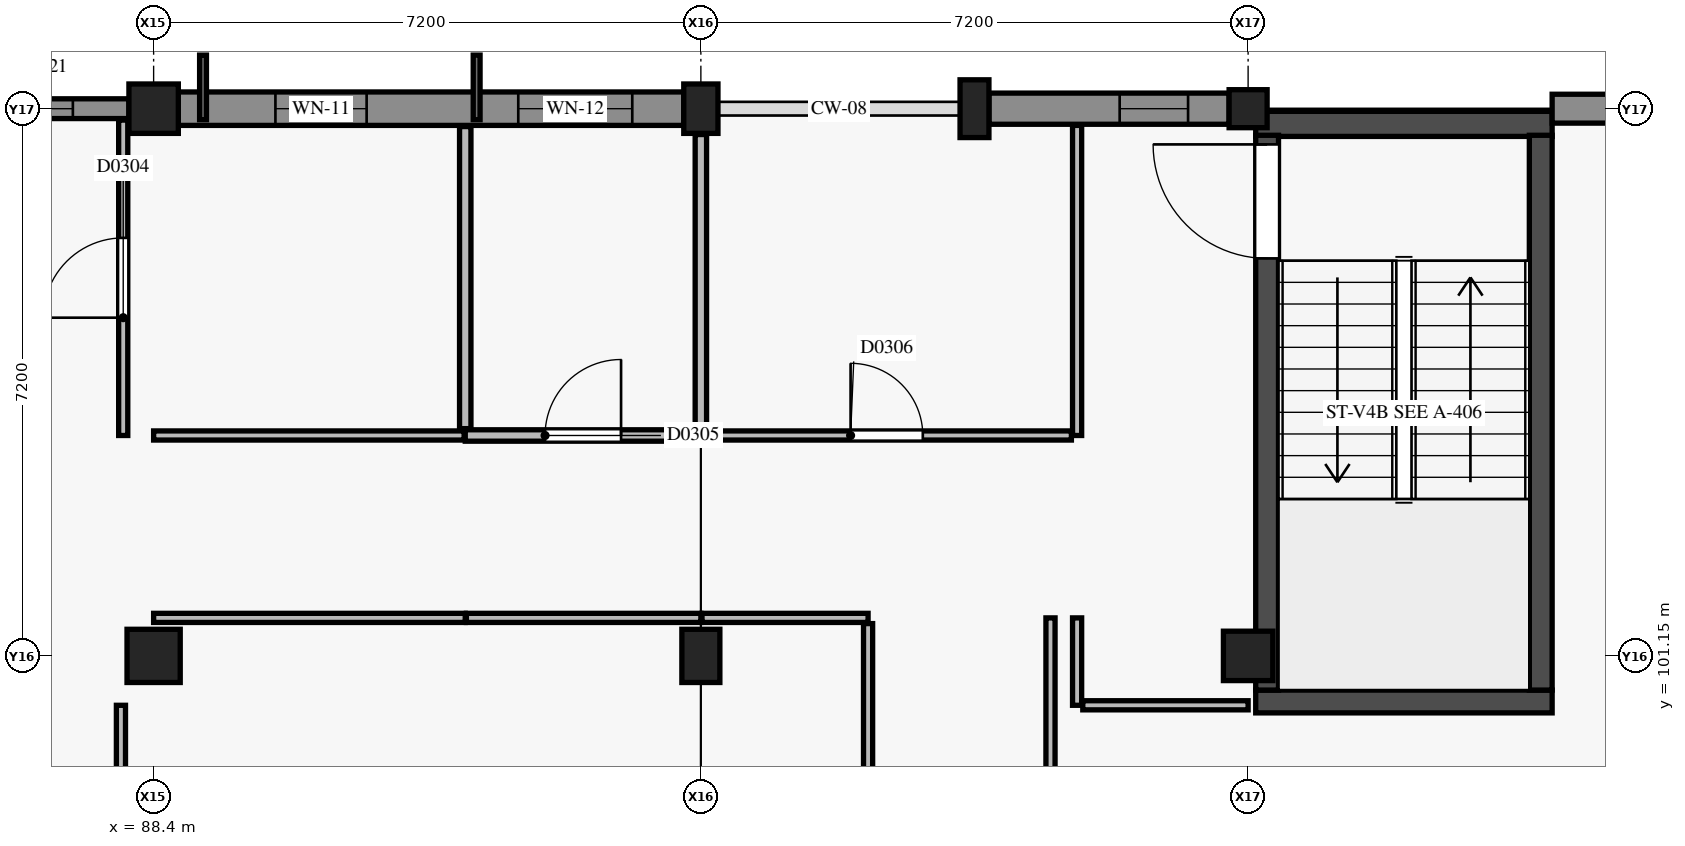
"""IFC4 building model, lengths in metres.
Left out: names, types, materials, properties, quantities, classifications, styles, units other than length and angle.
Written with IfcOpenShell. Run it as: python <this file> out.ifc"""

import sys

from ifc_helpers import new_model, si_unit, direction, frame, frame_2d, origin, origin_2d, place, context, subcontext, project, spatial, rectangle, circle, extrude, element, fill, save


model = new_model("IFC4")
c1 = context("Model", 3, precision=1e-05, world=origin(), true_north=direction((0.0, 1.0)))
c2 = subcontext(c1, "Body", "Model", "MODEL_VIEW")
j1 = project(units=[si_unit("LENGTHUNIT", "METRE"), si_unit("PLANEANGLEUNIT", "RADIAN")], contexts=[c1])
p1 = place(None, origin())
s1 = spatial("IfcSite", under=j1, at=p1, CompositionType="ELEMENT")
p2 = place(p1, origin())
s2 = spatial("IfcBuilding", under=s1, at=p2, CompositionType="ELEMENT")
p3 = place(p2, frame((0.0, 0.0, 17.4)))
s3 = spatial("IfcBuildingStorey", under=s2, at=p3, CompositionType="ELEMENT", Elevation=17.4)
p4 = place(p3, frame((88.4, 101.15, 0.0), z_axis=(0.0, 0.0, 1.0), x_axis=(1.0, 0.0, 0.0)))
e1 = element("IfcColumn", 1, at=p4, inside=s3, PredefinedType="COLUMN", context=c2, shape_type="SweptSolid", body=[
    extrude(rectangle(XDim=0.7, YDim=0.7, at=origin_2d()), origin(), (0.0, 0.0, 1.0), 4.2),
])
p5 = place(p3, frame((88.4, 108.35, 0.0), z_axis=(0.0, 0.0, 1.0), x_axis=(1.0, 0.0, 0.0)))
e2 = element("IfcColumn", 2, at=p5, inside=s3, PredefinedType="COLUMN", context=c2, shape_type="SweptSolid", body=[
    extrude(rectangle(XDim=0.65, YDim=0.65, at=origin_2d()), origin(), (0.0, 0.0, 1.0), 4.2),
])
p6 = place(p3, frame((95.6, 101.15, 0.0), z_axis=(0.0, 0.0, 1.0), x_axis=(1.0, 0.0, 0.0)))
e3 = element("IfcColumn", 3, at=p6, inside=s3, PredefinedType="COLUMN", context=c2, shape_type="SweptSolid", body=[
    extrude(rectangle(XDim=0.5, YDim=0.7, at=origin_2d()), origin(), (0.0, 0.0, 1.0), 4.2),
])
p7 = place(p3, frame((95.6, 108.35, 0.0), z_axis=(0.0, 0.0, 1.0), x_axis=(1.0, 0.0, 0.0)))
e4 = element("IfcColumn", 4, at=p7, inside=s3, PredefinedType="COLUMN", context=c2, shape_type="SweptSolid", body=[
    extrude(rectangle(XDim=0.45, YDim=0.65, at=origin_2d()), origin(), (0.0, 0.0, 1.0), 4.2),
])
p8 = place(p3, frame((102.8, 101.15, 0.0), z_axis=(0.0, 0.0, 1.0), x_axis=(1.0, 0.0, 0.0)))
e5 = element("IfcColumn", 5, at=p8, inside=s3, PredefinedType="COLUMN", context=c2, shape_type="SweptSolid", body=[
    extrude(rectangle(XDim=0.65, YDim=0.65, at=origin_2d()), origin(), (0.0, 0.0, 1.0), 4.2),
])
p9 = place(p3, frame((102.8, 108.35, 0.0), z_axis=(0.0, 0.0, 1.0), x_axis=(1.0, 0.0, 0.0)))
e6 = element("IfcColumn", 6, at=p9, inside=s3, PredefinedType="COLUMN", context=c2, shape_type="SweptSolid", body=[
    extrude(circle(Radius=0.25, at=origin_2d()), origin(), (0.0, 0.0, 1.0), 4.2),
])
p10 = place(p3, frame((99.2, 108.35, 0.0), z_axis=(0.0, 0.0, 1.0), x_axis=(1.0, 0.0, 0.0)))
e7 = element("IfcColumn", 7, at=p10, inside=s3, PredefinedType="PILASTER", context=c2, shape_type="SweptSolid", body=[
    extrude(rectangle(XDim=0.38, YDim=0.76, at=origin_2d()), origin(), (0.0, 0.0, 1.0), 4.2),
])
p11 = place(p3, frame((102.9, 100.55, 0.0), z_axis=(0.0, 0.0, 1.0), x_axis=(1.0, 0.0, 0.0)))
e8 = element("IfcWall", 8, at=p11, inside=s3, PredefinedType="SHEAR", context=c2, shape_type="SweptSolid", body=[
    extrude(rectangle(XDim=3.9, YDim=0.3, at=frame_2d((1.95, 0.0))), origin(), (0.0, 0.0, 1.0), 3.92),
])
p12 = place(p3, frame((102.9, 108.15, 0.0), z_axis=(0.0, 0.0, 1.0), x_axis=(1.0, 0.0, 0.0)))
e9 = element("IfcWall", 9, at=p12, inside=s3, PredefinedType="SHEAR", context=c2, shape_type="SweptSolid", body=[
    extrude(rectangle(XDim=3.9, YDim=0.33, at=frame_2d((1.95, 0.0))), origin(), (0.0, 0.0, 1.0), 3.92),
])
p13 = place(p3, frame((103.05, 100.7, 0.0), z_axis=(0.0, 0.0, 1.0), x_axis=(0.0, 1.0, 0.0)))
e10 = element("IfcWall", 10, at=p13, inside=s3, PredefinedType="SHEAR", context=c2, shape_type="SweptSolid", body=[
    extrude(rectangle(XDim=7.3, YDim=0.3, at=frame_2d((3.65, 0.0))), origin(), (0.0, 0.0, 1.0), 3.92),
])
p14 = place(p13, frame((5.68, 0.0, 0.0)))
e11 = element("IfcOpeningElement", 11, at=p14, cuts=e10, PredefinedType="OPENING", context=c2, shape_type="SweptSolid", body=[
    extrude(rectangle(XDim=1.5, YDim=2.15, at=frame_2d((0.75, 1.075))), frame((0.0, 0.16, 0.0), z_axis=(0.0, -1.0, 0.0), x_axis=(1.0, 0.0, 0.0)), (0.0, 0.0, 1.0), 0.32),
])
p15 = place(p3, frame((106.65, 100.7, 0.0), z_axis=(0.0, 0.0, 1.0), x_axis=(0.0, 1.0, 0.0)))
e12 = element("IfcWall", 12, at=p15, inside=s3, PredefinedType="SHEAR", context=c2, shape_type="SweptSolid", body=[
    extrude(rectangle(XDim=7.3, YDim=0.3, at=frame_2d((3.65, 0.0))), origin(), (0.0, 0.0, 1.0), 3.92),
])
p16 = place(p3, frame((85.7, 108.35, 0.0), z_axis=(0.0, 0.0, 1.0), x_axis=(1.0, 0.0, 0.0)))
e13 = element("IfcWall", 13, at=p16, inside=s3, PredefinedType="SOLIDWALL", context=c2, shape_type="SweptSolid", body=[
    extrude(rectangle(XDim=2.375, YDim=0.26, at=frame_2d((1.188, 0.0))), origin(), (0.0, 0.0, 1.0), 3.1),
])
p17 = place(p16, frame((0.738, 0.0, 0.95)))
e14 = element("IfcOpeningElement", 14, at=p17, cuts=e13, PredefinedType="OPENING", context=c2, shape_type="SweptSolid", body=[
    extrude(rectangle(XDim=0.9, YDim=1.2, at=frame_2d((0.45, 0.6))), frame((0.0, 0.14, 0.0), z_axis=(0.0, -1.0, 0.0), x_axis=(1.0, 0.0, 0.0)), (0.0, 0.0, 1.0), 0.28),
])
p18 = place(p3, frame((88.725, 108.35, 0.0), z_axis=(0.0, 0.0, 1.0), x_axis=(1.0, 0.0, 0.0)))
e15 = element("IfcWall", 15, at=p18, inside=s3, PredefinedType="USERDEFINED", context=c2, shape_type="SweptSolid", body=[
    extrude(rectangle(XDim=6.65, YDim=0.44, at=frame_2d((3.325, 0.0))), origin(), (0.0, 0.0, 1.0), 3.1),
])
p19 = place(p18, frame((1.278, 0.0, 0.9)))
e16 = element("IfcOpeningElement", 16, at=p19, cuts=e15, PredefinedType="OPENING", context=c2, shape_type="SweptSolid", body=[
    extrude(rectangle(XDim=1.2, YDim=1.5, at=frame_2d((0.6, 0.75))), frame((0.0, 0.23, 0.0), z_axis=(0.0, -1.0, 0.0), x_axis=(1.0, 0.0, 0.0)), (0.0, 0.0, 1.0), 0.46),
])
p20 = place(p18, frame((4.472, 0.0, 0.9)))
e17 = element("IfcOpeningElement", 17, at=p20, cuts=e15, PredefinedType="OPENING", context=c2, shape_type="SweptSolid", body=[
    extrude(rectangle(XDim=1.5, YDim=1.5, at=frame_2d((0.75, 0.75))), frame((0.0, 0.23, 0.0), z_axis=(0.0, -1.0, 0.0), x_axis=(1.0, 0.0, 0.0)), (0.0, 0.0, 1.0), 0.46),
])
p21 = place(p3, frame((99.39, 108.35, 0.0), z_axis=(0.0, 0.0, 1.0), x_axis=(1.0, 0.0, 0.0)))
e18 = element("IfcWall", 18, at=p21, inside=s3, PredefinedType="USERDEFINED", context=c2, shape_type="SweptSolid", body=[
    extrude(rectangle(XDim=3.16, YDim=0.41, at=frame_2d((1.58, 0.0))), origin(), (0.0, 0.0, 1.0), 3.1),
])
p22 = place(p21, frame((1.72, 0.0, 0.95)))
e19 = element("IfcOpeningElement", 19, at=p22, cuts=e18, PredefinedType="OPENING", context=c2, shape_type="SweptSolid", body=[
    extrude(rectangle(XDim=0.9, YDim=1.2, at=frame_2d((0.45, 0.6))), frame((0.0, 0.215, 0.0), z_axis=(0.0, -1.0, 0.0), x_axis=(1.0, 0.0, 0.0)), (0.0, 0.0, 1.0), 0.43),
])
p23 = place(p3, frame((106.8, 108.35, 0.0), z_axis=(0.0, 0.0, 1.0), x_axis=(1.0, 0.0, 0.0)))
e20 = element("IfcWall", 20, at=p23, inside=s3, PredefinedType="USERDEFINED", context=c2, shape_type="SweptSolid", body=[
    extrude(rectangle(XDim=2.975, YDim=0.38, at=frame_2d((1.487, 0.0))), origin(), (0.0, 0.0, 1.0), 3.1),
])
p24 = place(p23, frame((0.887, 0.0, 0.6)))
e21 = element("IfcOpeningElement", 21, at=p24, cuts=e20, PredefinedType="OPENING", context=c2, shape_type="SweptSolid", body=[
    extrude(rectangle(XDim=1.2, YDim=2.2, at=frame_2d((0.6, 1.1))), frame((0.0, 0.2, 0.0), z_axis=(0.0, -1.0, 0.0), x_axis=(1.0, 0.0, 0.0)), (0.0, 0.0, 1.0), 0.4),
])
p25 = place(p3, frame((92.5, 104.05, 0.0), z_axis=(0.0, 0.0, 1.0), x_axis=(1.0, 0.0, 0.0)))
e22 = element("IfcWall", 22, at=p25, inside=s3, PredefinedType="PARTITIONING", context=c2, shape_type="SweptSolid", body=[
    extrude(rectangle(XDim=3.1, YDim=0.15, at=frame_2d((1.55, 0.0))), origin(), (0.0, 0.0, 1.0), 3.325),
])
p26 = place(p25, frame((1.05, 0.0, 0.0)))
e23 = element("IfcOpeningElement", 23, at=p26, cuts=e22, PredefinedType="OPENING", context=c2, shape_type="SweptSolid", body=[
    extrude(rectangle(XDim=1.0, YDim=2.15, at=frame_2d((0.5, 1.075))), frame((0.0, 0.085, 0.0), z_axis=(0.0, -1.0, 0.0), x_axis=(1.0, 0.0, 0.0)), (0.0, 0.0, 1.0), 0.17),
])
p27 = place(p3, frame((87.97, 99.365, 0.0), z_axis=(0.0, 0.0, 1.0), x_axis=(0.0, 1.0, 0.0)))
e24 = element("IfcWall", 24, at=p27, inside=s3, PredefinedType="PARTITIONING", context=c2, shape_type="SweptSolid", body=[
    extrude(rectangle(XDim=1.135, YDim=0.12, at=frame_2d((0.567, 0.0))), origin(), (0.0, 0.0, 1.0), 3.92),
])
p28 = place(p3, frame((88.4, 101.65, 0.0), z_axis=(0.0, 0.0, 1.0), x_axis=(1.0, 0.0, 0.0)))
e25 = element("IfcWall", 25, at=p28, inside=s3, PredefinedType="PARTITIONING", context=c2, shape_type="SweptSolid", body=[
    extrude(rectangle(XDim=4.1, YDim=0.12, at=frame_2d((2.05, 0.0))), origin(), (0.0, 0.0, 1.0), 3.185),
])
p29 = place(p3, frame((92.515, 101.65, 0.0), z_axis=(0.0, 0.0, 1.0), x_axis=(1.0, 0.0, 0.0)))
e26 = element("IfcWall", 26, at=p29, inside=s3, PredefinedType="PARTITIONING", context=c2, shape_type="SweptSolid", body=[
    extrude(rectangle(XDim=3.085, YDim=0.12, at=frame_2d((1.542, 0.0))), origin(), (0.0, 0.0, 1.0), 3.325),
])
p30 = place(p3, frame((95.615, 101.65, 0.0), z_axis=(0.0, 0.0, 1.0), x_axis=(1.0, 0.0, 0.0)))
e27 = element("IfcWall", 27, at=p30, inside=s3, PredefinedType="PARTITIONING", context=c2, shape_type="SweptSolid", body=[
    extrude(rectangle(XDim=2.185, YDim=0.12, at=frame_2d((1.093, 0.0))), origin(), (0.0, 0.0, 1.0), 3.325),
])
p31 = place(p3, frame((97.8, 98.75, 0.0), z_axis=(0.0, 0.0, 1.0), x_axis=(0.0, 1.0, 0.0)))
e28 = element("IfcWall", 28, at=p31, inside=s3, PredefinedType="PARTITIONING", context=c2, shape_type="SweptSolid", body=[
    extrude(rectangle(XDim=2.825, YDim=0.12, at=frame_2d((1.413, 0.0))), origin(), (0.0, 0.0, 1.0), 3.325),
])
p32 = place(p3, frame((100.55, 100.5, 0.0), z_axis=(0.0, 0.0, 1.0), x_axis=(0.0, 1.0, 0.0)))
e29 = element("IfcWall", 29, at=p32, inside=s3, PredefinedType="PARTITIONING", context=c2, shape_type="SweptSolid", body=[
    extrude(rectangle(XDim=1.15, YDim=0.12, at=frame_2d((0.575, 0.0))), origin(), (0.0, 0.0, 1.0), 3.325),
])
p33 = place(p3, frame((100.625, 100.5, 0.0), z_axis=(0.0, 0.0, 1.0), x_axis=(1.0, 0.0, 0.0)))
e30 = element("IfcWall", 30, at=p33, inside=s3, PredefinedType="PARTITIONING", context=c2, shape_type="SweptSolid", body=[
    extrude(rectangle(XDim=2.175, YDim=0.12, at=frame_2d((1.087, 0.0))), origin(), (0.0, 0.0, 1.0), 3.325),
])
p34 = place(p3, frame((100.2, 98.825, 0.0), z_axis=(0.0, 0.0, 1.0), x_axis=(0.0, 1.0, 0.0)))
e31 = element("IfcWall", 31, at=p34, inside=s3, PredefinedType="PARTITIONING", context=c2, shape_type="SweptSolid", body=[
    extrude(rectangle(XDim=2.825, YDim=0.12, at=frame_2d((1.413, 0.0))), origin(), (0.0, 0.0, 1.0), 3.325),
])
p35 = place(p3, frame((88.0, 104.05, 0.0), z_axis=(0.0, 0.0, 1.0), x_axis=(0.0, 1.0, 0.0)))
e32 = element("IfcWall", 32, at=p35, inside=s3, PredefinedType="PARTITIONING", context=c2, shape_type="SweptSolid", body=[
    extrude(rectangle(XDim=4.15, YDim=0.12, at=frame_2d((2.075, 0.0))), origin(), (0.0, 0.0, 1.0), 3.92),
])
p36 = place(p35, frame((1.55, 0.0, 0.0)))
e33 = element("IfcOpeningElement", 33, at=p36, cuts=e32, PredefinedType="OPENING", context=c2, shape_type="SweptSolid", body=[
    extrude(rectangle(XDim=1.05, YDim=2.15, at=frame_2d((0.525, 1.075))), frame((0.0, 0.07, 0.0), z_axis=(0.0, -1.0, 0.0), x_axis=(1.0, 0.0, 0.0)), (0.0, 0.0, 1.0), 0.14),
])
p37 = place(p3, frame((88.4, 104.05, 0.0), z_axis=(0.0, 0.0, 1.0), x_axis=(1.0, 0.0, 0.0)))
e34 = element("IfcWall", 34, at=p37, inside=s3, PredefinedType="PARTITIONING", context=c2, shape_type="SweptSolid", body=[
    extrude(rectangle(XDim=4.085, YDim=0.12, at=frame_2d((2.042, 0.0))), origin(), (0.0, 0.0, 1.0), 3.185),
])
p38 = place(p3, frame((100.55, 104.05, 0.0), z_axis=(0.0, 0.0, 1.0), x_axis=(0.0, 1.0, 0.0)))
e35 = element("IfcWall", 35, at=p38, inside=s3, PredefinedType="PARTITIONING", context=c2, shape_type="SweptSolid", body=[
    extrude(rectangle(XDim=4.08, YDim=0.12, at=frame_2d((2.04, 0.0))), origin(), (0.0, 0.0, 1.0), 3.445),
])
p39 = place(p3, frame((95.615, 104.05, 0.0), z_axis=(0.0, 0.0, 1.0), x_axis=(1.0, 0.0, 0.0)))
e36 = element("IfcWall", 36, at=p39, inside=s3, PredefinedType="PARTITIONING", context=c2, shape_type="SweptSolid", body=[
    extrude(rectangle(XDim=4.86, YDim=0.12, at=frame_2d((2.43, 0.0))), origin(), (0.0, 0.0, 1.0), 3.325),
])
p40 = place(p39, frame((1.955, 0.0, 0.0)))
e37 = element("IfcOpeningElement", 37, at=p40, cuts=e36, PredefinedType="OPENING", context=c2, shape_type="SweptSolid", body=[
    extrude(rectangle(XDim=0.95, YDim=2.1, at=frame_2d((0.475, 1.05))), frame((0.0, 0.07, 0.0), z_axis=(0.0, -1.0, 0.0), x_axis=(1.0, 0.0, 0.0)), (0.0, 0.0, 1.0), 0.14),
])
p41 = place(p3, frame((92.5, 104.14, 0.0), z_axis=(0.0, 0.0, 1.0), x_axis=(0.0, 1.0, 0.0)))
e38 = element("IfcWall", 38, at=p41, inside=s3, PredefinedType="PARTITIONING", context=c2, shape_type="SweptSolid", body=[
    extrude(rectangle(XDim=3.975, YDim=0.15, at=frame_2d((1.988, 0.0))), origin(), (0.0, 0.0, 1.0), 3.485),
])
p42 = place(p3, frame((95.6, 104.14, 0.0), z_axis=(0.0, 0.0, 1.0), x_axis=(0.0, 1.0, 0.0)))
e39 = element("IfcWall", 39, at=p42, inside=s3, PredefinedType="PARTITIONING", context=c2, shape_type="SweptSolid", body=[
    extrude(rectangle(XDim=3.87, YDim=0.15, at=frame_2d((1.935, 0.0))), origin(), (0.0, 0.0, 1.0), 3.325),
])
p43 = place(p17, origin())
e40 = element("IfcWindow", 40, at=p43, inside=s3, PartitioningType="SINGLE_PANEL", PredefinedType="WINDOW", context=c2, shape_type="SweptSolid", body=[
    extrude(rectangle(XDim=0.9, YDim=1.2, at=frame_2d((0.45, 0.6))), frame((0.0, 0.03, 0.0), z_axis=(0.0, -1.0, 0.0), x_axis=(1.0, 0.0, 0.0)), (0.0, 0.0, 1.0), 0.06),
])
fill(e14, e40)
p44 = place(p19, origin())
e41 = element("IfcWindow", 41, at=p44, inside=s3, PartitioningType="SINGLE_PANEL", PredefinedType="WINDOW", context=c2, shape_type="SweptSolid", body=[
    extrude(rectangle(XDim=1.2, YDim=1.5, at=frame_2d((0.6, 0.75))), frame((0.0, 0.03, 0.0), z_axis=(0.0, -1.0, 0.0), x_axis=(1.0, 0.0, 0.0)), (0.0, 0.0, 1.0), 0.06),
])
fill(e16, e41)
p45 = place(p20, origin())
e42 = element("IfcWindow", 42, at=p45, inside=s3, PartitioningType="SINGLE_PANEL", PredefinedType="WINDOW", context=c2, shape_type="SweptSolid", body=[
    extrude(rectangle(XDim=1.5, YDim=1.5, at=frame_2d((0.75, 0.75))), frame((0.0, 0.03, 0.0), z_axis=(0.0, -1.0, 0.0), x_axis=(1.0, 0.0, 0.0)), (0.0, 0.0, 1.0), 0.06),
])
fill(e17, e42)
p46 = place(p22, origin())
e43 = element("IfcWindow", 43, at=p46, inside=s3, PartitioningType="SINGLE_PANEL", PredefinedType="WINDOW", context=c2, shape_type="SweptSolid", body=[
    extrude(rectangle(XDim=0.9, YDim=1.2, at=frame_2d((0.45, 0.6))), frame((0.0, 0.03, 0.0), z_axis=(0.0, -1.0, 0.0), x_axis=(1.0, 0.0, 0.0)), (0.0, 0.0, 1.0), 0.06),
])
fill(e19, e43)
p47 = place(p14, origin())
e44 = element("IfcDoor", 44, at=p47, inside=s3, OperationType="SINGLE_SWING_RIGHT", PredefinedType="DOOR", context=c2, shape_type="SweptSolid", body=[
    extrude(rectangle(XDim=1.5, YDim=2.15, at=frame_2d((0.75, 1.075))), frame((0.0, 0.025, 0.0), z_axis=(0.0, -1.0, 0.0), x_axis=(1.0, 0.0, 0.0)), (0.0, 0.0, 1.0), 0.05),
])
fill(e11, e44)
p48 = place(p36, origin())
e45 = element("IfcDoor", 45, at=p48, inside=s3, OperationType="SINGLE_SWING_LEFT", PredefinedType="DOOR", context=c2, shape_type="SweptSolid", body=[
    extrude(rectangle(XDim=1.05, YDim=2.15, at=frame_2d((0.525, 1.075))), frame((0.0, 0.025, 0.0), z_axis=(0.0, -1.0, 0.0), x_axis=(1.0, 0.0, 0.0)), (0.0, 0.0, 1.0), 0.05),
])
fill(e33, e45)
p49 = place(p26, origin())
e46 = element("IfcDoor", 46, at=p49, inside=s3, OperationType="SINGLE_SWING_RIGHT", PredefinedType="DOOR", context=c2, shape_type="SweptSolid", body=[
    extrude(rectangle(XDim=1.0, YDim=2.15, at=frame_2d((0.5, 1.075))), frame((0.0, 0.025, 0.0), z_axis=(0.0, -1.0, 0.0), x_axis=(1.0, 0.0, 0.0)), (0.0, 0.0, 1.0), 0.05),
])
fill(e23, e46)
p50 = place(p40, origin())
e47 = element("IfcDoor", 47, at=p50, inside=s3, OperationType="SINGLE_SWING_LEFT", PredefinedType="DOOR", context=c2, shape_type="SweptSolid", body=[
    extrude(rectangle(XDim=0.95, YDim=2.1, at=frame_2d((0.475, 1.05))), frame((0.0, 0.025, 0.0), z_axis=(0.0, -1.0, 0.0), x_axis=(1.0, 0.0, 0.0)), (0.0, 0.0, 1.0), 0.05),
])
fill(e37, e47)
save(model, sys.argv[1])
